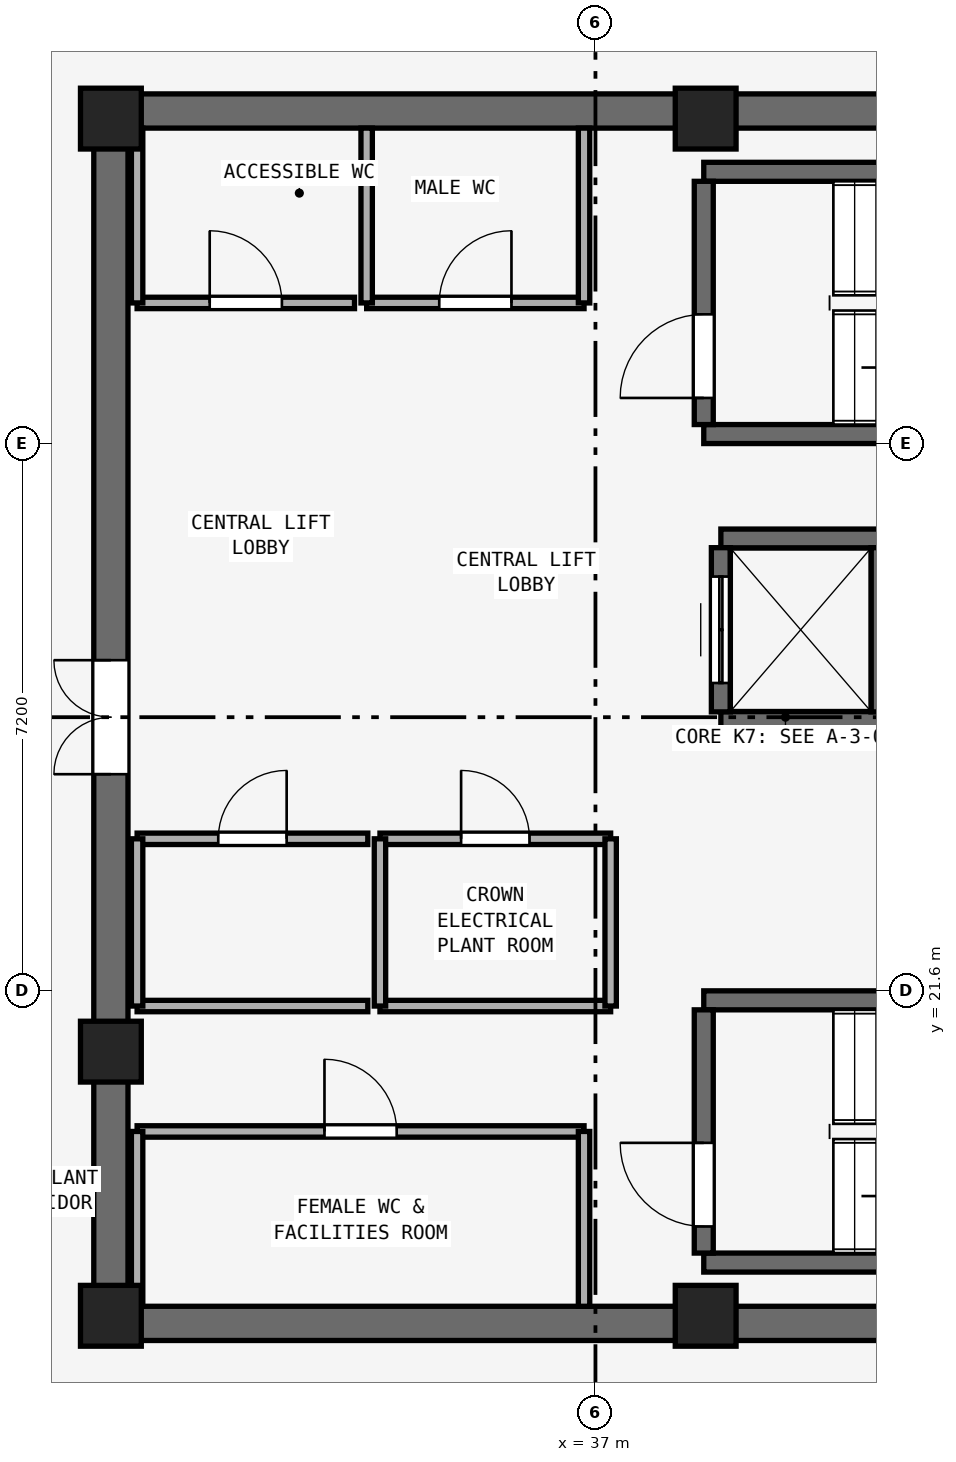
"""IFC4 building model, lengths in metres.
Left out: names, types, materials, properties, quantities, classifications, styles, units other than length and angle.
Written with IfcOpenShell. Run it as: python <this file> out.ifc"""

import sys

from ifc_helpers import new_model, si_unit, direction, frame, frame_2d, origin, origin_2d, place, context, subcontext, project, spatial, rectangle, extrude, element, fill, save


model = new_model("IFC4")
c1 = context("Model", 3, precision=1e-05, world=origin(), true_north=direction((0.0, 1.0)))
c2 = subcontext(c1, "Body", "Model", "MODEL_VIEW")
j1 = project(units=[si_unit("LENGTHUNIT", "METRE"), si_unit("PLANEANGLEUNIT", "RADIAN")], contexts=[c1])
p1 = place(None, origin())
s1 = spatial("IfcSite", under=j1, at=p1, CompositionType="ELEMENT")
p2 = place(p1, origin())
s2 = spatial("IfcBuilding", under=s1, at=p2, CompositionType="ELEMENT")
p3 = place(p2, frame((0.0, 0.0, 313.4)))
s3 = spatial("IfcBuildingStorey", under=s2, at=p3, CompositionType="ELEMENT", Elevation=313.4)
for number, where, z_axis, x_axis in (
    (1, (30.4, 17.225, 0.0), (0.0, 0.0, 1.0), (1.0, 0.0, 0.0)),
    (2, (30.4, 33.175, 0.0), (0.0, 0.0, 1.0), (1.0, 0.0, 0.0)),
):
    element("IfcWall", number, at=place(p3, frame(where, z_axis=z_axis, x_axis=x_axis)), inside=s3, PredefinedType="SHEAR", context=c2, shape_type="SweptSolid", body=[
        extrude(rectangle(XDim=18.2, YDim=0.45, at=frame_2d((9.1, 0.0))), origin(), (0.0, 0.0, 1.0), 3.72),
    ])
p4 = place(p3, frame((30.625, 17.45, 0.0), z_axis=(0.0, 0.0, 1.0), x_axis=(0.0, 1.0, 0.0)))
e3 = element("IfcWall", 3, at=p4, inside=s3, PredefinedType="SHEAR", context=c2, shape_type="SweptSolid", body=[
    extrude(rectangle(XDim=15.5, YDim=0.45, at=frame_2d((7.75, 0.0))), origin(), (0.0, 0.0, 1.0), 3.72),
])
p5 = place(p4, frame((7.0, 0.0, 0.0)))
e4 = element("IfcOpeningElement", 4, at=p5, cuts=e3, PredefinedType="OPENING", context=c2, shape_type="SweptSolid", body=[
    extrude(rectangle(XDim=1.5, YDim=2.15, at=frame_2d((0.75, 1.075))), frame((0.0, 0.235, 0.0), z_axis=(0.0, -1.0, 0.0), x_axis=(1.0, 0.0, 0.0)), (0.0, 0.0, 1.0), 0.47),
])
for number, where, z_axis, x_axis in (
    (5, (30.625, 17.325, 0.0), (0.0, 0.0, 1.0), (1.0, 0.0, 0.0)),
    (6, (38.45, 17.325, 0.0), (0.0, 0.0, 1.0), (1.0, 0.0, 0.0)),
    (7, (38.45, 33.075, 0.0), (0.0, 0.0, 1.0), (1.0, 0.0, 0.0)),
    (8, (30.625, 33.075, 0.0), (0.0, 0.0, 1.0), (1.0, 0.0, 0.0)),
    (9, (30.625, 20.8, 0.0), (0.0, 0.0, 1.0), (1.0, 0.0, 0.0)),
):
    element("IfcColumn", number, at=place(p3, frame(where, z_axis=z_axis, x_axis=x_axis)), inside=s3, PredefinedType="PILASTER", context=c2, shape_type="SweptSolid", body=[
        extrude(rectangle(XDim=0.8, YDim=0.8, at=origin_2d()), origin(), (0.0, 0.0, 1.0), 4.0),
    ])
for number, where, z_axis, x_axis in (
    (10, (38.425, 28.925, 0.0), (0.0, 0.0, 1.0), (1.0, 0.0, 0.0)),
    (11, (38.425, 32.375, 0.0), (0.0, 0.0, 1.0), (1.0, 0.0, 0.0)),
):
    element("IfcWall", number, at=place(p3, frame(where, z_axis=z_axis, x_axis=x_axis)), inside=s3, PredefinedType="SHEAR", context=c2, shape_type="SweptSolid", body=[
        extrude(rectangle(XDim=7.3, YDim=0.25, at=frame_2d((3.65, 0.0))), origin(), (0.0, 0.0, 1.0), 3.72),
    ])
p6 = place(p3, frame((38.425, 29.05, 0.0), z_axis=(0.0, 0.0, 1.0), x_axis=(0.0, 1.0, 0.0)))
e12 = element("IfcWall", 12, at=p6, inside=s3, PredefinedType="SHEAR", context=c2, shape_type="SweptSolid", body=[
    extrude(rectangle(XDim=3.2, YDim=0.25, at=frame_2d((1.6, 0.0))), origin(), (0.0, 0.0, 1.0), 3.72),
])
p7 = place(p6, frame((0.35, 0.0, 0.0)))
e13 = element("IfcOpeningElement", 13, at=p7, cuts=e12, PredefinedType="OPENING", context=c2, shape_type="SweptSolid", body=[
    extrude(rectangle(XDim=1.1, YDim=2.15, at=frame_2d((0.55, 1.075))), frame((0.0, 0.135, 0.0), z_axis=(0.0, -1.0, 0.0), x_axis=(1.0, 0.0, 0.0)), (0.0, 0.0, 1.0), 0.27),
])
for number, where, z_axis, x_axis in (
    (14, (38.425, 18.025, 0.0), (0.0, 0.0, 1.0), (1.0, 0.0, 0.0)),
    (15, (38.425, 21.475, 0.0), (0.0, 0.0, 1.0), (1.0, 0.0, 0.0)),
):
    element("IfcWall", number, at=place(p3, frame(where, z_axis=z_axis, x_axis=x_axis)), inside=s3, PredefinedType="SHEAR", context=c2, shape_type="SweptSolid", body=[
        extrude(rectangle(XDim=7.3, YDim=0.25, at=frame_2d((3.65, 0.0))), origin(), (0.0, 0.0, 1.0), 3.72),
    ])
p8 = place(p3, frame((38.425, 18.15, 0.0), z_axis=(0.0, 0.0, 1.0), x_axis=(0.0, 1.0, 0.0)))
e16 = element("IfcWall", 16, at=p8, inside=s3, PredefinedType="SHEAR", context=c2, shape_type="SweptSolid", body=[
    extrude(rectangle(XDim=3.2, YDim=0.25, at=frame_2d((1.6, 0.0))), origin(), (0.0, 0.0, 1.0), 3.72),
])
p9 = place(p8, frame((0.35, 0.0, 0.0)))
e17 = element("IfcOpeningElement", 17, at=p9, cuts=e16, PredefinedType="OPENING", context=c2, shape_type="SweptSolid", body=[
    extrude(rectangle(XDim=1.1, YDim=2.15, at=frame_2d((0.55, 1.075))), frame((0.0, 0.135, 0.0), z_axis=(0.0, -1.0, 0.0), x_axis=(1.0, 0.0, 0.0)), (0.0, 0.0, 1.0), 0.27),
])
for number, where, z_axis, x_axis in (
    (18, (38.65, 25.15, 0.0), (0.0, 0.0, 1.0), (1.0, 0.0, 0.0)),
    (19, (38.65, 27.55, 0.0), (0.0, 0.0, 1.0), (1.0, 0.0, 0.0)),
):
    element("IfcWall", number, at=place(p3, frame(where, z_axis=z_axis, x_axis=x_axis)), inside=s3, PredefinedType="SHEAR", context=c2, shape_type="SweptSolid", body=[
        extrude(rectangle(XDim=2.1, YDim=0.25, at=frame_2d((1.05, 0.0))), origin(), (0.0, 0.0, 1.0), 3.72),
    ])
p10 = place(p3, frame((38.65, 25.27, 0.0), z_axis=(0.0, 0.0, 1.0), x_axis=(0.0, 1.0, 0.0)))
e20 = element("IfcWall", 20, at=p10, inside=s3, PredefinedType="SHEAR", context=c2, shape_type="SweptSolid", body=[
    extrude(rectangle(XDim=2.16, YDim=0.25, at=frame_2d((1.08, 0.0))), origin(), (0.0, 0.0, 1.0), 3.72),
])
p11 = place(p10, frame((0.38, 0.0, 0.0)))
e21 = element("IfcOpeningElement", 21, at=p11, cuts=e20, PredefinedType="OPENING", context=c2, shape_type="SweptSolid", body=[
    extrude(rectangle(XDim=1.4, YDim=2.2, at=frame_2d((0.7, 1.1))), frame((0.0, 0.135, 0.0), z_axis=(0.0, -1.0, 0.0), x_axis=(1.0, 0.0, 0.0)), (0.0, 0.0, 1.0), 0.27),
])
p12 = place(p3, frame((40.75, 25.27, 0.0), z_axis=(0.0, 0.0, 1.0), x_axis=(0.0, 1.0, 0.0)))
e22 = element("IfcWall", 22, at=p12, inside=s3, PredefinedType="SHEAR", context=c2, shape_type="SweptSolid", body=[
    extrude(rectangle(XDim=2.16, YDim=0.25, at=frame_2d((1.08, 0.0))), origin(), (0.0, 0.0, 1.0), 3.72),
])
p13 = place(p3, frame((30.97, 30.65, 0.0), z_axis=(0.0, 0.0, 1.0), x_axis=(1.0, 0.0, 0.0)))
e23 = element("IfcWall", 23, at=p13, inside=s3, PredefinedType="PARTITIONING", context=c2, shape_type="SweptSolid", body=[
    extrude(rectangle(XDim=2.86, YDim=0.15, at=frame_2d((1.43, 0.0))), origin(), (0.0, 0.0, 1.0), 3.72),
])
p14 = place(p13, frame((0.955, 0.0, 0.0)))
e24 = element("IfcOpeningElement", 24, at=p14, cuts=e23, PredefinedType="OPENING", context=c2, shape_type="SweptSolid", body=[
    extrude(rectangle(XDim=0.95, YDim=2.1, at=frame_2d((0.475, 1.05))), frame((0.0, 0.085, 0.0), z_axis=(0.0, -1.0, 0.0), x_axis=(1.0, 0.0, 0.0)), (0.0, 0.0, 1.0), 0.17),
])
p15 = place(p3, frame((30.97, 30.65, 0.0), z_axis=(0.0, 0.0, 1.0), x_axis=(0.0, 1.0, 0.0)))
e25 = element("IfcWall", 25, at=p15, inside=s3, PredefinedType="PARTITIONING", context=c2, shape_type="SweptSolid", body=[
    extrude(rectangle(XDim=2.3, YDim=0.15, at=frame_2d((1.15, 0.0))), origin(), (0.0, 0.0, 1.0), 2.82),
])
p16 = place(p3, frame((33.99, 30.65, 0.0), z_axis=(0.0, 0.0, 1.0), x_axis=(1.0, 0.0, 0.0)))
e26 = element("IfcWall", 26, at=p16, inside=s3, PredefinedType="PARTITIONING", context=c2, shape_type="SweptSolid", body=[
    extrude(rectangle(XDim=2.86, YDim=0.15, at=frame_2d((1.43, 0.0))), origin(), (0.0, 0.0, 1.0), 3.72),
])
p17 = place(p16, frame((0.955, 0.0, 0.0)))
e27 = element("IfcOpeningElement", 27, at=p17, cuts=e26, PredefinedType="OPENING", context=c2, shape_type="SweptSolid", body=[
    extrude(rectangle(XDim=0.95, YDim=2.1, at=frame_2d((0.475, 1.05))), frame((0.0, 0.085, 0.0), z_axis=(0.0, -1.0, 0.0), x_axis=(1.0, 0.0, 0.0)), (0.0, 0.0, 1.0), 0.17),
])
for number, where, z_axis, x_axis in (
    (28, (33.99, 30.65, 0.0), (0.0, 0.0, 1.0), (0.0, 1.0, 0.0)),
    (29, (36.85, 30.65, 0.0), (0.0, 0.0, 1.0), (0.0, 1.0, 0.0)),
):
    element("IfcWall", number, at=place(p3, frame(where, z_axis=z_axis, x_axis=x_axis)), inside=s3, PredefinedType="PARTITIONING", context=c2, shape_type="SweptSolid", body=[
        extrude(rectangle(XDim=2.3, YDim=0.15, at=frame_2d((1.15, 0.0))), origin(), (0.0, 0.0, 1.0), 3.72),
    ])
p18 = place(p3, frame((30.97, 19.75, 0.0), z_axis=(0.0, 0.0, 1.0), x_axis=(1.0, 0.0, 0.0)))
e30 = element("IfcWall", 30, at=p18, inside=s3, PredefinedType="PARTITIONING", context=c2, shape_type="SweptSolid", body=[
    extrude(rectangle(XDim=5.88, YDim=0.15, at=frame_2d((2.94, 0.0))), origin(), (0.0, 0.0, 1.0), 3.72),
])
p19 = place(p18, frame((2.465, 0.0, 0.0)))
e31 = element("IfcOpeningElement", 31, at=p19, cuts=e30, PredefinedType="OPENING", context=c2, shape_type="SweptSolid", body=[
    extrude(rectangle(XDim=0.95, YDim=2.1, at=frame_2d((0.475, 1.05))), frame((0.0, 0.085, 0.0), z_axis=(0.0, -1.0, 0.0), x_axis=(1.0, 0.0, 0.0)), (0.0, 0.0, 1.0), 0.17),
])
p20 = place(p3, frame((30.97, 17.45, 0.0), z_axis=(0.0, 0.0, 1.0), x_axis=(0.0, 1.0, 0.0)))
e32 = element("IfcWall", 32, at=p20, inside=s3, PredefinedType="PARTITIONING", context=c2, shape_type="SweptSolid", body=[
    extrude(rectangle(XDim=2.3, YDim=0.15, at=frame_2d((1.15, 0.0))), origin(), (0.0, 0.0, 1.0), 2.82),
])
p21 = place(p3, frame((36.85, 17.45, 0.0), z_axis=(0.0, 0.0, 1.0), x_axis=(0.0, 1.0, 0.0)))
e33 = element("IfcWall", 33, at=p21, inside=s3, PredefinedType="PARTITIONING", context=c2, shape_type="SweptSolid", body=[
    extrude(rectangle(XDim=2.3, YDim=0.15, at=frame_2d((1.15, 0.0))), origin(), (0.0, 0.0, 1.0), 3.72),
])
p22 = place(p3, frame((30.97, 21.4, 0.0), z_axis=(0.0, 0.0, 1.0), x_axis=(1.0, 0.0, 0.0)))
e34 = element("IfcWall", 34, at=p22, inside=s3, PredefinedType="PARTITIONING", context=c2, shape_type="SweptSolid", body=[
    extrude(rectangle(XDim=3.035, YDim=0.15, at=frame_2d((1.518, 0.0))), origin(), (0.0, 0.0, 1.0), 3.72),
])
p23 = place(p3, frame((30.97, 23.6, 0.0), z_axis=(0.0, 0.0, 1.0), x_axis=(1.0, 0.0, 0.0)))
e35 = element("IfcWall", 35, at=p23, inside=s3, PredefinedType="PARTITIONING", context=c2, shape_type="SweptSolid", body=[
    extrude(rectangle(XDim=3.035, YDim=0.15, at=frame_2d((1.518, 0.0))), origin(), (0.0, 0.0, 1.0), 3.72),
])
p24 = place(p23, frame((1.067, 0.0, 0.0)))
e36 = element("IfcOpeningElement", 36, at=p24, cuts=e35, PredefinedType="OPENING", context=c2, shape_type="SweptSolid", body=[
    extrude(rectangle(XDim=0.9, YDim=2.1, at=frame_2d((0.45, 1.05))), frame((0.0, 0.085, 0.0), z_axis=(0.0, -1.0, 0.0), x_axis=(1.0, 0.0, 0.0)), (0.0, 0.0, 1.0), 0.17),
])
p25 = place(p3, frame((30.97, 21.4, 0.0), z_axis=(0.0, 0.0, 1.0), x_axis=(0.0, 1.0, 0.0)))
e37 = element("IfcWall", 37, at=p25, inside=s3, PredefinedType="PARTITIONING", context=c2, shape_type="SweptSolid", body=[
    extrude(rectangle(XDim=2.2, YDim=0.15, at=frame_2d((1.1, 0.0))), origin(), (0.0, 0.0, 1.0), 2.82),
])
p26 = place(p3, frame((34.165, 21.4, 0.0), z_axis=(0.0, 0.0, 1.0), x_axis=(1.0, 0.0, 0.0)))
e38 = element("IfcWall", 38, at=p26, inside=s3, PredefinedType="PARTITIONING", context=c2, shape_type="SweptSolid", body=[
    extrude(rectangle(XDim=3.035, YDim=0.15, at=frame_2d((1.518, 0.0))), origin(), (0.0, 0.0, 1.0), 3.72),
])
p27 = place(p3, frame((34.165, 23.6, 0.0), z_axis=(0.0, 0.0, 1.0), x_axis=(1.0, 0.0, 0.0)))
e39 = element("IfcWall", 39, at=p27, inside=s3, PredefinedType="PARTITIONING", context=c2, shape_type="SweptSolid", body=[
    extrude(rectangle(XDim=3.035, YDim=0.15, at=frame_2d((1.518, 0.0))), origin(), (0.0, 0.0, 1.0), 3.72),
])
p28 = place(p27, frame((1.067, 0.0, 0.0)))
e40 = element("IfcOpeningElement", 40, at=p28, cuts=e39, PredefinedType="OPENING", context=c2, shape_type="SweptSolid", body=[
    extrude(rectangle(XDim=0.9, YDim=2.1, at=frame_2d((0.45, 1.05))), frame((0.0, 0.085, 0.0), z_axis=(0.0, -1.0, 0.0), x_axis=(1.0, 0.0, 0.0)), (0.0, 0.0, 1.0), 0.17),
])
for number, where, z_axis, x_axis in (
    (41, (34.165, 21.4, 0.0), (0.0, 0.0, 1.0), (0.0, 1.0, 0.0)),
    (42, (37.2, 21.4, 0.0), (0.0, 0.0, 1.0), (0.0, 1.0, 0.0)),
):
    element("IfcWall", number, at=place(p3, frame(where, z_axis=z_axis, x_axis=x_axis)), inside=s3, PredefinedType="PARTITIONING", context=c2, shape_type="SweptSolid", body=[
        extrude(rectangle(XDim=2.2, YDim=0.15, at=frame_2d((1.1, 0.0))), origin(), (0.0, 0.0, 1.0), 3.72),
    ])
p29 = place(p7, origin())
e43 = element("IfcDoor", 43, at=p29, inside=s3, OperationType="SINGLE_SWING_LEFT", PredefinedType="DOOR", context=c2, shape_type="SweptSolid", body=[
    extrude(rectangle(XDim=1.1, YDim=2.15, at=frame_2d((0.55, 1.075))), frame((0.0, 0.025, 0.0), z_axis=(0.0, -1.0, 0.0), x_axis=(1.0, 0.0, 0.0)), (0.0, 0.0, 1.0), 0.05),
])
fill(e13, e43)
p30 = place(p9, origin())
e44 = element("IfcDoor", 44, at=p30, inside=s3, OperationType="SINGLE_SWING_RIGHT", PredefinedType="DOOR", context=c2, shape_type="SweptSolid", body=[
    extrude(rectangle(XDim=1.1, YDim=2.15, at=frame_2d((0.55, 1.075))), frame((0.0, 0.025, 0.0), z_axis=(0.0, -1.0, 0.0), x_axis=(1.0, 0.0, 0.0)), (0.0, 0.0, 1.0), 0.05),
])
fill(e17, e44)
p31 = place(p11, origin())
e45 = element("IfcDoor", 45, at=p31, inside=s3, OperationType="DOUBLE_DOOR_SLIDING", PredefinedType="DOOR", context=c2, shape_type="SweptSolid", body=[
    extrude(rectangle(XDim=1.4, YDim=2.2, at=frame_2d((0.7, 1.1))), frame((0.0, 0.025, 0.0), z_axis=(0.0, -1.0, 0.0), x_axis=(1.0, 0.0, 0.0)), (0.0, 0.0, 1.0), 0.05),
])
fill(e21, e45)
p32 = place(p5, origin())
e46 = element("IfcDoor", 46, at=p32, inside=s3, OperationType="DOUBLE_DOOR_SINGLE_SWING", PredefinedType="DOOR", context=c2, shape_type="SweptSolid", body=[
    extrude(rectangle(XDim=1.5, YDim=2.15, at=frame_2d((0.75, 1.075))), frame((0.0, 0.025, 0.0), z_axis=(0.0, -1.0, 0.0), x_axis=(1.0, 0.0, 0.0)), (0.0, 0.0, 1.0), 0.05),
])
fill(e4, e46)
p33 = place(p14, origin())
e47 = element("IfcDoor", 47, at=p33, inside=s3, OperationType="SINGLE_SWING_LEFT", PredefinedType="DOOR", context=c2, shape_type="SweptSolid", body=[
    extrude(rectangle(XDim=0.95, YDim=2.1, at=frame_2d((0.475, 1.05))), frame((0.0, 0.025, 0.0), z_axis=(0.0, -1.0, 0.0), x_axis=(1.0, 0.0, 0.0)), (0.0, 0.0, 1.0), 0.05),
])
fill(e24, e47)
p34 = place(p17, origin())
e48 = element("IfcDoor", 48, at=p34, inside=s3, OperationType="SINGLE_SWING_RIGHT", PredefinedType="DOOR", context=c2, shape_type="SweptSolid", body=[
    extrude(rectangle(XDim=0.95, YDim=2.1, at=frame_2d((0.475, 1.05))), frame((0.0, 0.025, 0.0), z_axis=(0.0, -1.0, 0.0), x_axis=(1.0, 0.0, 0.0)), (0.0, 0.0, 1.0), 0.05),
])
fill(e27, e48)
p35 = place(p19, origin())
e49 = element("IfcDoor", 49, at=p35, inside=s3, OperationType="SINGLE_SWING_LEFT", PredefinedType="DOOR", context=c2, shape_type="SweptSolid", body=[
    extrude(rectangle(XDim=0.95, YDim=2.1, at=frame_2d((0.475, 1.05))), frame((0.0, 0.025, 0.0), z_axis=(0.0, -1.0, 0.0), x_axis=(1.0, 0.0, 0.0)), (0.0, 0.0, 1.0), 0.05),
])
fill(e31, e49)
p36 = place(p24, origin())
e50 = element("IfcDoor", 50, at=p36, inside=s3, OperationType="SINGLE_SWING_RIGHT", PredefinedType="DOOR", context=c2, shape_type="SweptSolid", body=[
    extrude(rectangle(XDim=0.9, YDim=2.1, at=frame_2d((0.45, 1.05))), frame((0.0, 0.025, 0.0), z_axis=(0.0, -1.0, 0.0), x_axis=(1.0, 0.0, 0.0)), (0.0, 0.0, 1.0), 0.05),
])
fill(e36, e50)
p37 = place(p28, origin())
e51 = element("IfcDoor", 51, at=p37, inside=s3, OperationType="SINGLE_SWING_LEFT", PredefinedType="DOOR", context=c2, shape_type="SweptSolid", body=[
    extrude(rectangle(XDim=0.9, YDim=2.1, at=frame_2d((0.45, 1.05))), frame((0.0, 0.025, 0.0), z_axis=(0.0, -1.0, 0.0), x_axis=(1.0, 0.0, 0.0)), (0.0, 0.0, 1.0), 0.05),
])
fill(e40, e51)
save(model, sys.argv[1])
